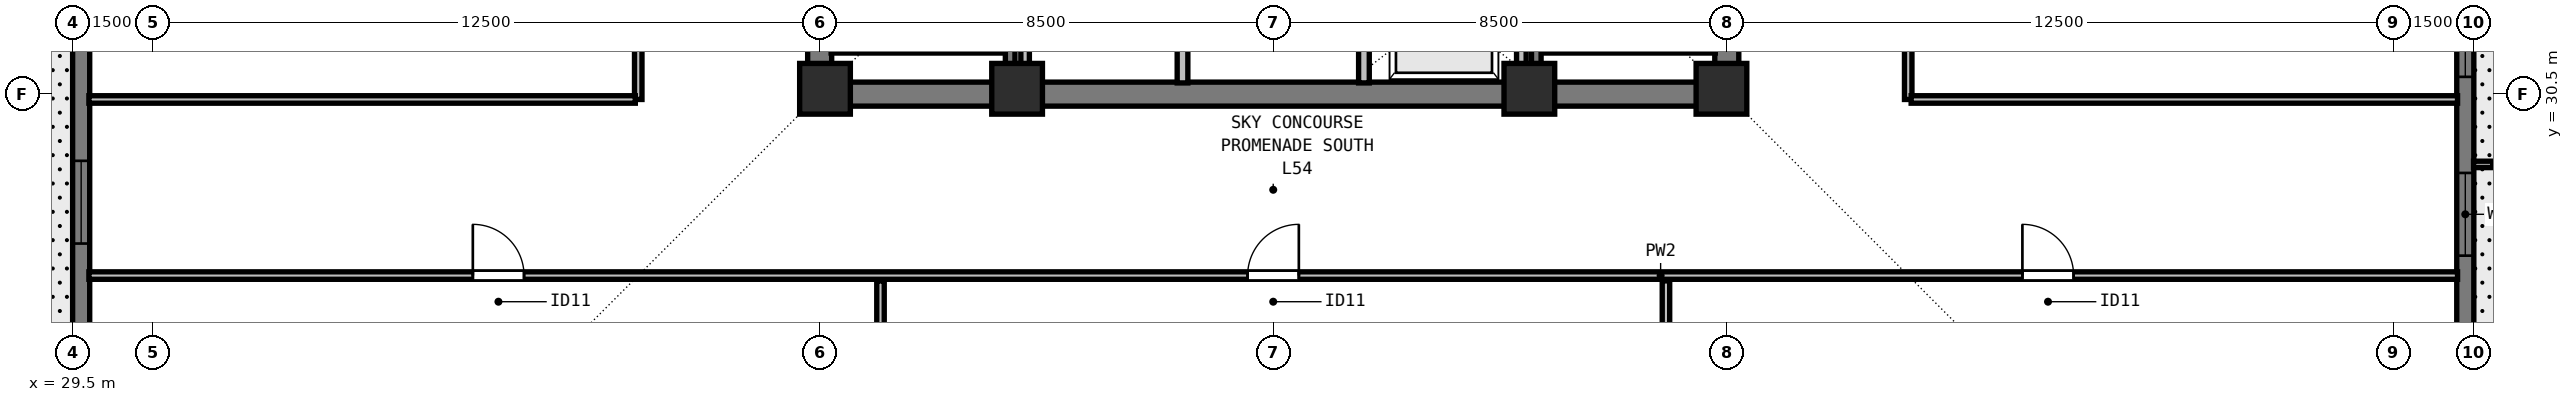
"""IFC4 building model, lengths in metres.
Left out: names, types, materials, properties, quantities, classifications, styles, units other than length and angle.
Written with IfcOpenShell. Run it as: python <this file> out.ifc"""

import sys

from ifc_helpers import new_model, si_unit, direction, frame, frame_2d, origin, origin_2d, place, context, subcontext, project, spatial, rectangle, extrude, element, fill, save


model = new_model("IFC4")
c1 = context("Model", 3, precision=1e-05, world=origin(), true_north=direction((0.0, 1.0)))
c2 = subcontext(c1, "Body", "Model", "MODEL_VIEW")
j1 = project(units=[si_unit("LENGTHUNIT", "METRE"), si_unit("PLANEANGLEUNIT", "RADIAN")], contexts=[c1])
p1 = place(None, origin())
s1 = spatial("IfcSite", under=j1, at=p1, CompositionType="ELEMENT")
p2 = place(p1, origin())
s2 = spatial("IfcBuilding", under=s1, at=p2, CompositionType="ELEMENT")
p3 = place(p2, frame((0.0, 0.0, 198.0)))
s3 = spatial("IfcBuildingStorey", under=s2, at=p3, CompositionType="ELEMENT", Elevation=198.0)
for number, where, z_axis, x_axis in (
    (1, (43.6, 30.6, 0.0), (0.0, 0.0, 1.0), (1.0, 0.0, 0.0)),
    (2, (47.2, 30.6, 0.0), (0.0, 0.0, 1.0), (1.0, 0.0, 0.0)),
    (3, (56.8, 30.6, 0.0), (0.0, 0.0, 1.0), (1.0, 0.0, 0.0)),
    (4, (60.4, 30.6, 0.0), (0.0, 0.0, 1.0), (1.0, 0.0, 0.0)),
):
    element("IfcColumn", number, at=place(p3, frame(where, z_axis=z_axis, x_axis=x_axis)), inside=s3, PredefinedType="COLUMN", context=c2, shape_type="SweptSolid", body=[
        extrude(rectangle(XDim=0.95, YDim=0.95, at=origin_2d()), origin(), (0.0, 0.0, 1.0), 4.5),
    ])
p4 = place(p3, frame((74.34, 44.4, 0.0), z_axis=(0.0, 0.0, 1.0), x_axis=(0.0, -1.0, 0.0)))
e5 = element("IfcWall", 5, at=p4, inside=s3, PredefinedType="SOLIDWALL", context=c2, shape_type="SweptSolid", body=[
    extrude(rectangle(XDim=22.602, YDim=0.32, at=frame_2d((11.301, 0.0))), origin(), (0.0, 0.0, 1.0), 4.29),
])
p5 = place(p4, frame((2.225, 0.0, 0.8)))
e6 = element("IfcOpeningElement", 6, at=p5, cuts=e5, PredefinedType="OPENING", context=c2, shape_type="SweptSolid", body=[
    extrude(rectangle(XDim=1.55, YDim=1.8, at=frame_2d((0.775, 0.9))), frame((0.0, 0.17, 0.0), z_axis=(0.0, -1.0, 0.0), x_axis=(1.0, 0.0, 0.0)), (0.0, 0.0, 1.0), 0.34),
])
p6 = place(p4, frame((5.576, 0.0, 0.8)))
e7 = element("IfcOpeningElement", 7, at=p6, cuts=e5, PredefinedType="OPENING", context=c2, shape_type="SweptSolid", body=[
    extrude(rectangle(XDim=1.85, YDim=1.85, at=frame_2d((0.925, 0.925))), frame((0.0, 0.17, 0.0), z_axis=(0.0, -1.0, 0.0), x_axis=(1.0, 0.0, 0.0)), (0.0, 0.0, 1.0), 0.34),
])
p7 = place(p4, frame((7.976, 0.0, 0.8)))
e8 = element("IfcOpeningElement", 8, at=p7, cuts=e5, PredefinedType="OPENING", context=c2, shape_type="SweptSolid", body=[
    extrude(rectangle(XDim=1.55, YDim=1.8, at=frame_2d((0.775, 0.9))), frame((0.0, 0.17, 0.0), z_axis=(0.0, -1.0, 0.0), x_axis=(1.0, 0.0, 0.0)), (0.0, 0.0, 1.0), 0.34),
])
p8 = place(p4, frame((11.726, 0.0, 0.8)))
e9 = element("IfcOpeningElement", 9, at=p8, cuts=e5, PredefinedType="OPENING", context=c2, shape_type="SweptSolid", body=[
    extrude(rectangle(XDim=1.85, YDim=1.85, at=frame_2d((0.925, 0.925))), frame((0.0, 0.17, 0.0), z_axis=(0.0, -1.0, 0.0), x_axis=(1.0, 0.0, 0.0)), (0.0, 0.0, 1.0), 0.34),
])
p9 = place(p4, frame((15.377, 0.0, 0.8)))
e10 = element("IfcOpeningElement", 10, at=p9, cuts=e5, PredefinedType="OPENING", context=c2, shape_type="SweptSolid", body=[
    extrude(rectangle(XDim=1.55, YDim=1.8, at=frame_2d((0.775, 0.9))), frame((0.0, 0.17, 0.0), z_axis=(0.0, -1.0, 0.0), x_axis=(1.0, 0.0, 0.0)), (0.0, 0.0, 1.0), 0.34),
])
p10 = place(p4, frame((18.2, 0.0, 0.0)))
e11 = element("IfcOpeningElement", 11, at=p10, cuts=e5, PredefinedType="OPENING", context=c2, shape_type="SweptSolid", body=[
    extrude(rectangle(XDim=1.15, YDim=2.15, at=frame_2d((0.575, 1.075))), frame((0.0, 0.17, 0.0), z_axis=(0.0, -1.0, 0.0), x_axis=(1.0, 0.0, 0.0)), (0.0, 0.0, 1.0), 0.34),
])
p11 = place(p3, frame((29.66, 21.5, 0.0), z_axis=(0.0, 0.0, 1.0), x_axis=(0.0, 1.0, 0.0)))
e12 = element("IfcWall", 12, at=p11, inside=s3, PredefinedType="SOLIDWALL", context=c2, shape_type="SweptSolid", body=[
    extrude(rectangle(XDim=13.8, YDim=0.32, at=frame_2d((6.9, 0.0))), origin(), (0.0, 0.0, 1.0), 4.29),
])
p12 = place(p11, frame((6.2, 0.0, 0.8)))
e13 = element("IfcOpeningElement", 13, at=p12, cuts=e12, PredefinedType="OPENING", context=c2, shape_type="SweptSolid", body=[
    extrude(rectangle(XDim=1.55, YDim=1.8, at=frame_2d((0.775, 0.9))), frame((0.0, 0.17, 0.0), z_axis=(0.0, -1.0, 0.0), x_axis=(1.0, 0.0, 0.0)), (0.0, 0.0, 1.0), 0.34),
])
p13 = place(p3, frame((43.275, 30.5, 0.0), z_axis=(0.0, 0.0, 1.0), x_axis=(1.0, 0.0, 0.0)))
e14 = element("IfcWall", 14, at=p13, inside=s3, PredefinedType="SHEAR", context=c2, shape_type="SweptSolid", body=[
    extrude(rectangle(XDim=17.45, YDim=0.45, at=frame_2d((8.725, 0.0))), origin(), (0.0, 0.0, 1.0), 4.29),
])
for number, where, z_axis, x_axis in (
    (15, (43.5, 30.715, 0.0), (0.0, 0.0, 1.0), (0.0, 1.0, 0.0)),
    (16, (60.5, 30.715, 0.0), (0.0, 0.0, 1.0), (0.0, 1.0, 0.0)),
):
    element("IfcWall", number, at=place(p3, frame(where, z_axis=z_axis, x_axis=x_axis)), inside=s3, PredefinedType="SHEAR", context=c2, shape_type="SweptSolid", body=[
        extrude(rectangle(XDim=8.035, YDim=0.45, at=frame_2d((4.018, 0.0))), origin(), (0.0, 0.0, 1.0), 4.29),
    ])
p14 = place(p3, frame((50.3, 30.71, 0.0), z_axis=(0.0, 0.0, 1.0), x_axis=(0.0, 1.0, 0.0)))
e17 = element("IfcWall", 17, at=p14, inside=s3, PredefinedType="SOLIDWALL", context=c2, shape_type="SweptSolid", body=[
    extrude(rectangle(XDim=7.905, YDim=0.2, at=frame_2d((3.953, 0.0))), origin(), (0.0, 0.0, 1.0), 4.29),
])
p15 = place(p14, frame((3.34, 0.0, 0.0)))
e18 = element("IfcOpeningElement", 18, at=p15, cuts=e17, PredefinedType="OPENING", context=c2, shape_type="SweptSolid", body=[
    extrude(rectangle(XDim=0.9, YDim=2.12, at=frame_2d((0.45, 1.06))), frame((0.0, 0.11, 0.0), z_axis=(0.0, -1.0, 0.0), x_axis=(1.0, 0.0, 0.0)), (0.0, 0.0, 1.0), 0.22),
])
p16 = place(p3, frame((53.7, 30.71, 0.0), z_axis=(0.0, 0.0, 1.0), x_axis=(0.0, 1.0, 0.0)))
e19 = element("IfcWall", 19, at=p16, inside=s3, PredefinedType="SOLIDWALL", context=c2, shape_type="SweptSolid", body=[
    extrude(rectangle(XDim=7.905, YDim=0.2, at=frame_2d((3.953, 0.0))), origin(), (0.0, 0.0, 1.0), 4.29),
])
p17 = place(p16, frame((0.84, 0.0, 0.0)))
e20 = element("IfcOpeningElement", 20, at=p17, cuts=e19, PredefinedType="OPENING", context=c2, shape_type="SweptSolid", body=[
    extrude(rectangle(XDim=1.1, YDim=2.2, at=frame_2d((0.55, 1.1))), frame((0.0, 0.11, 0.0), z_axis=(0.0, -1.0, 0.0), x_axis=(1.0, 0.0, 0.0)), (0.0, 0.0, 1.0), 0.22),
])
p18 = place(p16, frame((3.54, 0.0, 0.0)))
e21 = element("IfcOpeningElement", 21, at=p18, cuts=e19, PredefinedType="OPENING", context=c2, shape_type="SweptSolid", body=[
    extrude(rectangle(XDim=1.1, YDim=2.2, at=frame_2d((0.55, 1.1))), frame((0.0, 0.11, 0.0), z_axis=(0.0, -1.0, 0.0), x_axis=(1.0, 0.0, 0.0)), (0.0, 0.0, 1.0), 0.22),
])
p19 = place(p16, frame((6.24, 0.0, 0.0)))
e22 = element("IfcOpeningElement", 22, at=p19, cuts=e19, PredefinedType="OPENING", context=c2, shape_type="SweptSolid", body=[
    extrude(rectangle(XDim=1.1, YDim=2.2, at=frame_2d((0.55, 1.1))), frame((0.0, 0.11, 0.0), z_axis=(0.0, -1.0, 0.0), x_axis=(1.0, 0.0, 0.0)), (0.0, 0.0, 1.0), 0.22),
])
p20 = place(p3, frame((47.35, 30.71, 0.0), z_axis=(0.0, 0.0, 1.0), x_axis=(0.0, 1.0, 0.0)))
e23 = element("IfcWall", 23, at=p20, inside=s3, PredefinedType="PARTITIONING", context=c2, shape_type="SweptSolid", body=[
    extrude(rectangle(XDim=7.905, YDim=0.16, at=frame_2d((3.953, 0.0))), origin(), (0.0, 0.0, 1.0), 4.29),
])
p21 = place(p3, frame((56.65, 30.71, 0.0), z_axis=(0.0, 0.0, 1.0), x_axis=(0.0, 1.0, 0.0)))
e24 = element("IfcWall", 24, at=p21, inside=s3, PredefinedType="SOLIDWALL", context=c2, shape_type="SweptSolid", body=[
    extrude(rectangle(XDim=7.905, YDim=0.18, at=frame_2d((3.953, 0.0))), origin(), (0.0, 0.0, 1.0), 4.29),
])
p22 = place(p3, frame((29.805, 27.1, 0.0), z_axis=(0.0, 0.0, 1.0), x_axis=(1.0, 0.0, 0.0)))
e25 = element("IfcWall", 25, at=p22, inside=s3, PredefinedType="PARTITIONING", context=c2, shape_type="SweptSolid", body=[
    extrude(rectangle(XDim=44.39, YDim=0.14, at=frame_2d((22.195, 0.0))), origin(), (0.0, 0.0, 1.0), 3.958),
])
p23 = place(p22, frame((7.195, 0.0, 0.0)))
e26 = element("IfcOpeningElement", 26, at=p23, cuts=e25, PredefinedType="OPENING", context=c2, shape_type="SweptSolid", body=[
    extrude(rectangle(XDim=0.96, YDim=2.12, at=frame_2d((0.48, 1.06))), frame((0.0, 0.08, 0.0), z_axis=(0.0, -1.0, 0.0), x_axis=(1.0, 0.0, 0.0)), (0.0, 0.0, 1.0), 0.16),
])
p24 = place(p22, frame((21.715, 0.0, 0.0)))
e27 = element("IfcOpeningElement", 27, at=p24, cuts=e25, PredefinedType="OPENING", context=c2, shape_type="SweptSolid", body=[
    extrude(rectangle(XDim=0.96, YDim=2.12, at=frame_2d((0.48, 1.06))), frame((0.0, 0.08, 0.0), z_axis=(0.0, -1.0, 0.0), x_axis=(1.0, 0.0, 0.0)), (0.0, 0.0, 1.0), 0.16),
])
p25 = place(p22, frame((36.235, 0.0, 0.0)))
e28 = element("IfcOpeningElement", 28, at=p25, cuts=e25, PredefinedType="OPENING", context=c2, shape_type="SweptSolid", body=[
    extrude(rectangle(XDim=0.96, YDim=2.12, at=frame_2d((0.48, 1.06))), frame((0.0, 0.08, 0.0), z_axis=(0.0, -1.0, 0.0), x_axis=(1.0, 0.0, 0.0)), (0.0, 0.0, 1.0), 0.16),
])
p26 = place(p3, frame((40.1, 30.4, 0.0), z_axis=(0.0, 0.0, 1.0), x_axis=(0.0, 1.0, 0.0)))
e29 = element("IfcWall", 29, at=p26, inside=s3, PredefinedType="PARTITIONING", context=c2, shape_type="SweptSolid", body=[
    extrude(rectangle(XDim=17.2, YDim=0.14, at=frame_2d((8.6, 0.0))), origin(), (0.0, 0.0, 1.0), 4.29),
])
p27 = place(p26, frame((3.772, 0.0, 0.0)))
e30 = element("IfcOpeningElement", 30, at=p27, cuts=e29, PredefinedType="OPENING", context=c2, shape_type="SweptSolid", body=[
    extrude(rectangle(XDim=0.96, YDim=2.12, at=frame_2d((0.48, 1.06))), frame((0.0, 0.08, 0.0), z_axis=(0.0, -1.0, 0.0), x_axis=(1.0, 0.0, 0.0)), (0.0, 0.0, 1.0), 0.16),
])
p28 = place(p26, frame((12.272, 0.0, 0.0)))
e31 = element("IfcOpeningElement", 31, at=p28, cuts=e29, PredefinedType="OPENING", context=c2, shape_type="SweptSolid", body=[
    extrude(rectangle(XDim=0.96, YDim=2.12, at=frame_2d((0.48, 1.06))), frame((0.0, 0.08, 0.0), z_axis=(0.0, -1.0, 0.0), x_axis=(1.0, 0.0, 0.0)), (0.0, 0.0, 1.0), 0.16),
])
p29 = place(p3, frame((63.9, 30.4, 0.0), z_axis=(0.0, 0.0, 1.0), x_axis=(0.0, 1.0, 0.0)))
e32 = element("IfcWall", 32, at=p29, inside=s3, PredefinedType="PARTITIONING", context=c2, shape_type="SweptSolid", body=[
    extrude(rectangle(XDim=17.2, YDim=0.14, at=frame_2d((8.6, 0.0))), origin(), (0.0, 0.0, 1.0), 4.29),
])
p30 = place(p29, frame((3.968, 0.0, 0.0)))
e33 = element("IfcOpeningElement", 33, at=p30, cuts=e32, PredefinedType="OPENING", context=c2, shape_type="SweptSolid", body=[
    extrude(rectangle(XDim=0.96, YDim=2.12, at=frame_2d((0.48, 1.06))), frame((0.0, 0.08, 0.0), z_axis=(0.0, -1.0, 0.0), x_axis=(1.0, 0.0, 0.0)), (0.0, 0.0, 1.0), 0.16),
])
p31 = place(p29, frame((12.468, 0.0, 0.0)))
e34 = element("IfcOpeningElement", 34, at=p31, cuts=e32, PredefinedType="OPENING", context=c2, shape_type="SweptSolid", body=[
    extrude(rectangle(XDim=0.96, YDim=2.12, at=frame_2d((0.48, 1.06))), frame((0.0, 0.08, 0.0), z_axis=(0.0, -1.0, 0.0), x_axis=(1.0, 0.0, 0.0)), (0.0, 0.0, 1.0), 0.16),
])
for number, where, z_axis, x_axis in (
    (35, (29.805, 30.4, 0.0), (0.0, 0.0, 1.0), (1.0, 0.0, 0.0)),
    (36, (63.955, 30.4, 0.0), (0.0, 0.0, 1.0), (1.0, 0.0, 0.0)),
):
    element("IfcWall", number, at=place(p3, frame(where, z_axis=z_axis, x_axis=x_axis)), inside=s3, PredefinedType="PARTITIONING", context=c2, shape_type="SweptSolid", body=[
        extrude(rectangle(XDim=10.24, YDim=0.14, at=frame_2d((5.12, 0.0))), origin(), (0.0, 0.0, 1.0), 4.29),
    ])
for number, where, z_axis, x_axis in (
    (37, (44.64, 16.805, 0.0), (0.0, 0.0, 1.0), (0.0, 1.0, 0.0)),
    (38, (59.36, 16.805, 0.0), (0.0, 0.0, 1.0), (0.0, 1.0, 0.0)),
):
    element("IfcWall", number, at=place(p3, frame(where, z_axis=z_axis, x_axis=x_axis)), inside=s3, PredefinedType="PARTITIONING", context=c2, shape_type="SweptSolid", body=[
        extrude(rectangle(XDim=10.195, YDim=0.14, at=frame_2d((5.098, 0.0))), origin(), (0.0, 0.0, 1.0), 4.29),
    ])
p32 = place(p3, frame((43.715, 31.36, 0.0), z_axis=(0.0, 0.0, 1.0), x_axis=(1.0, 0.0, 0.0)))
e39 = element("IfcWall", 39, at=p32, inside=s3, PredefinedType="SOLIDWALL", context=c2, shape_type="SweptSolid", body=[
    extrude(rectangle(XDim=3.28, YDim=0.18, at=frame_2d((1.64, 0.0))), origin(), (0.0, 0.0, 1.0), 4.29),
])
p33 = place(p3, frame((47.07, 38.78, 0.0), z_axis=(0.0, 0.0, 1.0), x_axis=(0.0, -1.0, 0.0)))
e40 = element("IfcWall", 40, at=p33, inside=s3, PredefinedType="SOLIDWALL", context=c2, shape_type="SweptSolid", body=[
    extrude(rectangle(XDim=8.067, YDim=0.18, at=frame_2d((4.034, 0.0))), origin(), (0.0, 0.0, 1.0), 4.29),
])
p34 = place(p3, frame((57.005, 31.36, 0.0), z_axis=(0.0, 0.0, 1.0), x_axis=(1.0, 0.0, 0.0)))
e41 = element("IfcWall", 41, at=p34, inside=s3, PredefinedType="SOLIDWALL", context=c2, shape_type="SweptSolid", body=[
    extrude(rectangle(XDim=3.28, YDim=0.18, at=frame_2d((1.64, 0.0))), origin(), (0.0, 0.0, 1.0), 4.29),
])
p35 = place(p3, frame((56.93, 38.78, 0.0), z_axis=(0.0, 0.0, 1.0), x_axis=(0.0, -1.0, 0.0)))
e42 = element("IfcWall", 42, at=p35, inside=s3, PredefinedType="SOLIDWALL", context=c2, shape_type="SweptSolid", body=[
    extrude(rectangle(XDim=8.067, YDim=0.18, at=frame_2d((4.034, 0.0))), origin(), (0.0, 0.0, 1.0), 4.29),
])
p36 = place(p8, origin())
e43 = element("IfcWindow", 43, at=p36, inside=s3, PartitioningType="SINGLE_PANEL", PredefinedType="WINDOW", context=c2, shape_type="SweptSolid", body=[
    extrude(rectangle(XDim=1.85, YDim=1.85, at=frame_2d((0.925, 0.925))), frame((0.0, -0.05, 0.0), z_axis=(0.0, -1.0, 0.0), x_axis=(1.0, 0.0, 0.0)), (0.0, 0.0, 1.0), 0.06),
])
fill(e9, e43)
p37 = place(p9, origin())
e44 = element("IfcWindow", 44, at=p37, inside=s3, PartitioningType="SINGLE_PANEL", PredefinedType="WINDOW", context=c2, shape_type="SweptSolid", body=[
    extrude(rectangle(XDim=1.55, YDim=1.8, at=frame_2d((0.775, 0.9))), frame((0.0, -0.05, 0.0), z_axis=(0.0, -1.0, 0.0), x_axis=(1.0, 0.0, 0.0)), (0.0, 0.0, 1.0), 0.06),
])
fill(e10, e44)
p38 = place(p12, origin())
e45 = element("IfcWindow", 45, at=p38, inside=s3, PartitioningType="SINGLE_PANEL", PredefinedType="WINDOW", context=c2, shape_type="SweptSolid", body=[
    extrude(rectangle(XDim=1.55, YDim=1.8, at=frame_2d((0.775, 0.9))), frame((0.0, -0.04, 0.0), z_axis=(0.0, -1.0, 0.0), x_axis=(1.0, 0.0, 0.0)), (0.0, 0.0, 1.0), 0.06),
])
fill(e13, e45)
p39 = place(p23, origin())
e46 = element("IfcDoor", 46, at=p39, inside=s3, OperationType="SINGLE_SWING_LEFT", PredefinedType="DOOR", context=c2, shape_type="SweptSolid", body=[
    extrude(rectangle(XDim=0.96, YDim=2.12, at=frame_2d((0.48, 1.06))), frame((0.0, 0.025, 0.0), z_axis=(0.0, -1.0, 0.0), x_axis=(1.0, 0.0, 0.0)), (0.0, 0.0, 1.0), 0.05),
])
fill(e26, e46)
p40 = place(p24, origin())
e47 = element("IfcDoor", 47, at=p40, inside=s3, OperationType="SINGLE_SWING_RIGHT", PredefinedType="DOOR", context=c2, shape_type="SweptSolid", body=[
    extrude(rectangle(XDim=0.96, YDim=2.12, at=frame_2d((0.48, 1.06))), frame((0.0, 0.025, 0.0), z_axis=(0.0, -1.0, 0.0), x_axis=(1.0, 0.0, 0.0)), (0.0, 0.0, 1.0), 0.05),
])
fill(e27, e47)
p41 = place(p25, origin())
e48 = element("IfcDoor", 48, at=p41, inside=s3, OperationType="SINGLE_SWING_LEFT", PredefinedType="DOOR", context=c2, shape_type="SweptSolid", body=[
    extrude(rectangle(XDim=0.96, YDim=2.12, at=frame_2d((0.48, 1.06))), frame((0.0, 0.025, 0.0), z_axis=(0.0, -1.0, 0.0), x_axis=(1.0, 0.0, 0.0)), (0.0, 0.0, 1.0), 0.05),
])
fill(e28, e48)
save(model, sys.argv[1])
